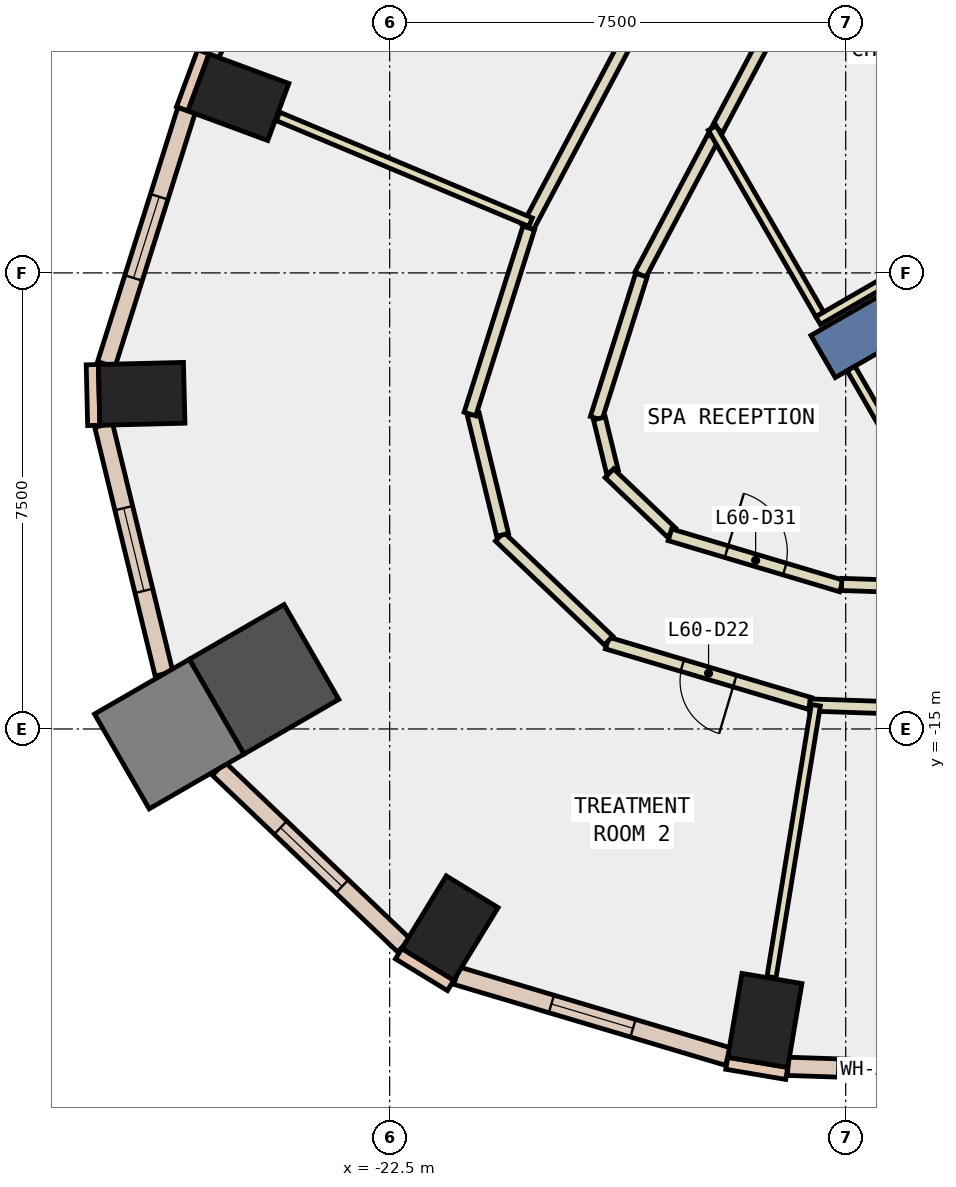
"""IFC4 building model, lengths in metres.
Left out: names, types, materials, properties, quantities, classifications, styles, units other than length and angle.
Written with IfcOpenShell. Run it as: python <this file> out.ifc"""

import sys

from ifc_helpers import new_model, si_unit, direction, frame, frame_2d, origin, origin_2d, place, context, subcontext, project, spatial, rectangle, extrude, element, fill, save


model = new_model("IFC4")
c1 = context("Model", 3, precision=1e-05, world=origin(), true_north=direction((0.0, 1.0)))
c2 = subcontext(c1, "Body", "Model", "MODEL_VIEW")
j1 = project(units=[si_unit("LENGTHUNIT", "METRE"), si_unit("PLANEANGLEUNIT", "RADIAN")], contexts=[c1])
p1 = place(None, origin())
s1 = spatial("IfcSite", under=j1, at=p1, CompositionType="ELEMENT")
p2 = place(p1, origin())
s2 = spatial("IfcBuilding", under=s1, at=p2, CompositionType="ELEMENT")
p3 = place(p2, frame((0.0, 0.0, 263.0)))
s3 = spatial("IfcBuildingStorey", under=s2, at=p3, CompositionType="ELEMENT", Elevation=263.0)
for number, where, z_axis, x_axis in (
    (1, (-16.33, -19.793, -0.34), (0.0, 0.0, 1.0), (-0.986, 0.167, 0.0)),
    (2, (-24.988, -4.611, -0.34), (0.0, 0.0, 1.0), (0.347, 0.938, 0.0)),
    (3, (-26.579, -9.489, -0.34), (0.0, 0.0, 1.0), (-0.025, 1.0, 0.0)),
):
    element("IfcColumn", number, at=place(p3, frame(where, z_axis=z_axis, x_axis=x_axis)), inside=s3, PredefinedType="COLUMN", context=c2, shape_type="SweptSolid", body=[
        extrude(rectangle(XDim=1.0, YDim=1.4, at=origin_2d()), origin(), (0.0, 0.0, 1.0), 3.6),
    ])
p4 = place(p3, frame((-24.566, -14.184, -0.34), z_axis=(0.0, 0.0, 1.0), x_axis=(0.866025403784, 0.5, 0.0)))
e4 = element("IfcColumn", 4, at=p4, inside=s3, PredefinedType="COLUMN", context=c2, shape_type="SweptSolid", body=[
    extrude(rectangle(XDim=1.8, YDim=1.8, at=origin_2d()), origin(), (0.0, 0.0, 1.0), 3.6),
])
p5 = place(p3, frame((-21.508, -18.274, -0.34), z_axis=(0.0, 0.0, 1.0), x_axis=(-0.853341581839, 0.521352227103, 0.0)))
e5 = element("IfcColumn", 5, at=p5, inside=s3, PredefinedType="COLUMN", context=c2, shape_type="SweptSolid", body=[
    extrude(rectangle(XDim=1.0, YDim=1.4, at=origin_2d()), origin(), (0.0, 0.0, 1.0), 3.6),
])
p6 = place(p3, frame((-26.125, -15.084, -0.34), z_axis=(0.0, 0.0, 1.0), x_axis=(0.866025403784, 0.5, 0.0)))
e6 = element("IfcColumn", 6, at=p6, inside=s3, PredefinedType="COLUMN", context=c2, shape_type="SweptSolid", body=[
    extrude(rectangle(XDim=1.8, YDim=1.8, at=origin_2d()), origin(), (0.0, 0.0, 1.0), 3.6),
])
p7 = place(p3, frame((-7.578, -4.375, -0.34), z_axis=(0.0, 0.0, 1.0), x_axis=(-0.866024315419, -0.5000018851, 0.0)))
e7 = element("IfcWall", 7, at=p7, inside=s3, PredefinedType="SHEAR", context=c2, shape_type="SweptSolid", body=[
    extrude(rectangle(XDim=9.0, YDim=0.8, at=frame_2d((4.5, 0.0))), origin(), (0.0, 0.0, 1.0), 3.6),
])
for number, where, z_axis, x_axis in (
    (8, (-25.565, -3.865, 0.0), (0.0, 0.0, 1.0), (-0.347, -0.938, 0.0)),
    (9, (-16.956, -20.498, 0.0), (0.0, 0.0, 1.0), (0.986, -0.167, 0.0)),
):
    element("IfcWall", number, at=place(p3, frame(where, z_axis=z_axis, x_axis=x_axis)), inside=s3, PredefinedType="STANDARD", context=c2, shape_type="SweptSolid", body=[
        extrude(rectangle(XDim=1.0, YDim=0.2, at=frame_2d((0.5, 0.0))), origin(), (0.0, 0.0, 1.0), 3.26),
    ])
p8 = place(p3, frame((-27.391, -9.009, 0.0), z_axis=(0.0, 0.0, 1.0), x_axis=(0.024186470916, -0.999707464524, 0.0)))
e10 = element("IfcWall", 10, at=p8, inside=s3, PredefinedType="STANDARD", context=c2, shape_type="SweptSolid", body=[
    extrude(rectangle(XDim=0.999, YDim=0.2, at=frame_2d((0.5, 0.0))), origin(), (0.0, 0.0, 1.0), 3.26),
])
p9 = place(p3, frame((-22.352, -18.696, 0.0), z_axis=(0.0, 0.0, 1.0), x_axis=(0.853679739553, -0.520798331677, 0.0)))
e11 = element("IfcWall", 11, at=p9, inside=s3, PredefinedType="STANDARD", context=c2, shape_type="SweptSolid", body=[
    extrude(rectangle(XDim=1.0, YDim=0.2, at=frame_2d((0.5, 0.0))), origin(), (0.0, 0.0, 1.0), 3.26),
])
p10 = place(p3, frame((-15.951, -20.548, 0.0), z_axis=(0.0, 0.0, 1.0), x_axis=(0.999450376985, -0.033150323459, 0.0)))
e12 = element("IfcWall", 12, at=p10, inside=s3, PredefinedType="STANDARD", context=c2, shape_type="SweptSolid", body=[
    extrude(rectangle(XDim=7.659, YDim=0.3, at=frame_2d((3.83, 0.0))), origin(), (0.0, 0.0, 1.0), 3.26),
])
p11 = place(p10, frame((0.815, 0.0, 0.9)))
e13 = element("IfcOpeningElement", 13, at=p11, cuts=e12, PredefinedType="OPENING", context=c2, shape_type="SweptSolid", body=[
    extrude(rectangle(XDim=2.2, YDim=2.0, at=frame_2d((1.1, 1.0))), frame((0.0, 0.16, 0.0), z_axis=(0.0, -1.0, 0.0), x_axis=(1.0, 0.0, 0.0)), (0.0, 0.0, 1.0), 0.32),
])
p12 = place(p10, frame((4.644, 0.0, 0.9)))
e14 = element("IfcOpeningElement", 14, at=p12, cuts=e12, PredefinedType="OPENING", context=c2, shape_type="SweptSolid", body=[
    extrude(rectangle(XDim=2.2, YDim=2.0, at=frame_2d((1.1, 1.0))), frame((0.0, 0.16, 0.0), z_axis=(0.0, -1.0, 0.0), x_axis=(1.0, 0.0, 0.0)), (0.0, 0.0, 1.0), 0.32),
])
p13 = place(p3, frame((-22.784, 1.132, 0.0), z_axis=(0.0, 0.0, 1.0), x_axis=(-0.468220106253, -0.883611867338, 0.0)))
e15 = element("IfcWall", 15, at=p13, inside=s3, PredefinedType="STANDARD", context=c2, shape_type="SweptSolid", body=[
    extrude(rectangle(XDim=5.703, YDim=0.3, at=frame_2d((2.852, 0.0))), origin(), (0.0, 0.0, 1.0), 3.26),
])
p14 = place(p13, frame((0.476, 0.0, 0.9)))
e16 = element("IfcOpeningElement", 16, at=p14, cuts=e15, PredefinedType="OPENING", context=c2, shape_type="SweptSolid", body=[
    extrude(rectangle(XDim=1.9, YDim=2.0, at=frame_2d((0.95, 1.0))), frame((0.0, 0.16, 0.0), z_axis=(0.0, -1.0, 0.0), x_axis=(1.0, 0.0, 0.0)), (0.0, 0.0, 1.0), 0.32),
])
p15 = place(p13, frame((3.327, 0.0, 0.9)))
e17 = element("IfcOpeningElement", 17, at=p15, cuts=e15, PredefinedType="OPENING", context=c2, shape_type="SweptSolid", body=[
    extrude(rectangle(XDim=1.9, YDim=2.0, at=frame_2d((0.95, 1.0))), frame((0.0, 0.16, 0.0), z_axis=(0.0, -1.0, 0.0), x_axis=(1.0, 0.0, 0.0)), (0.0, 0.0, 1.0), 0.32),
])
p16 = place(p3, frame((-25.842, -4.827, 0.0), z_axis=(0.0, 0.0, 1.0), x_axis=(-0.30108868778, -0.953596142028, 0.0)))
e18 = element("IfcWall", 18, at=p16, inside=s3, PredefinedType="STANDARD", context=c2, shape_type="SweptSolid", body=[
    extrude(rectangle(XDim=4.38, YDim=0.3, at=frame_2d((2.19, 0.0))), origin(), (0.0, 0.0, 1.0), 3.26),
])
p17 = place(p16, frame((1.49, 0.0, 0.9)))
e19 = element("IfcOpeningElement", 19, at=p17, cuts=e18, PredefinedType="OPENING", context=c2, shape_type="SweptSolid", body=[
    extrude(rectangle(XDim=1.4, YDim=2.0, at=frame_2d((0.7, 1.0))), frame((0.0, 0.16, 0.0), z_axis=(0.0, -1.0, 0.0), x_axis=(1.0, 0.0, 0.0)), (0.0, 0.0, 1.0), 0.32),
])
p18 = place(p3, frame((-27.205, -10.003, 0.0), z_axis=(0.0, 0.0, 1.0), x_axis=(0.236077883519, -0.97173413695, 0.0)))
e20 = element("IfcWall", 20, at=p18, inside=s3, PredefinedType="STANDARD", context=c2, shape_type="SweptSolid", body=[
    extrude(rectangle(XDim=4.211, YDim=0.3, at=frame_2d((2.105, 0.0))), origin(), (0.0, 0.0, 1.0), 3.26),
])
p19 = place(p18, frame((1.405, 0.0, 0.9)))
e21 = element("IfcOpeningElement", 21, at=p19, cuts=e20, PredefinedType="OPENING", context=c2, shape_type="SweptSolid", body=[
    extrude(rectangle(XDim=1.4, YDim=2.0, at=frame_2d((0.7, 1.0))), frame((0.0, 0.16, 0.0), z_axis=(0.0, -1.0, 0.0), x_axis=(1.0, 0.0, 0.0)), (0.0, 0.0, 1.0), 0.32),
])
p20 = place(p3, frame((-25.312, -15.653, 0.0), z_axis=(0.0, 0.0, 1.0), x_axis=(0.723526681061, -0.690296415892, 0.0)))
e22 = element("IfcWall", 22, at=p20, inside=s3, PredefinedType="STANDARD", context=c2, shape_type="SweptSolid", body=[
    extrude(rectangle(XDim=4.21, YDim=0.3, at=frame_2d((2.105, 0.0))), origin(), (0.0, 0.0, 1.0), 3.26),
])
p21 = place(p20, frame((1.405, 0.0, 0.9)))
e23 = element("IfcOpeningElement", 23, at=p21, cuts=e22, PredefinedType="OPENING", context=c2, shape_type="SweptSolid", body=[
    extrude(rectangle(XDim=1.4, YDim=2.0, at=frame_2d((0.7, 1.0))), frame((0.0, 0.16, 0.0), z_axis=(0.0, -1.0, 0.0), x_axis=(1.0, 0.0, 0.0)), (0.0, 0.0, 1.0), 0.32),
])
p22 = place(p3, frame((-21.401, -19.057, 0.0), z_axis=(0.0, 0.0, 1.0), x_axis=(0.958361270465, -0.285558532131, 0.0)))
e24 = element("IfcWall", 24, at=p22, inside=s3, PredefinedType="STANDARD", context=c2, shape_type="SweptSolid", body=[
    extrude(rectangle(XDim=4.658, YDim=0.3, at=frame_2d((2.329, 0.0))), origin(), (0.0, 0.0, 1.0), 3.26),
])
p23 = place(p22, frame((1.629, 0.0, 0.9)))
e25 = element("IfcOpeningElement", 25, at=p23, cuts=e24, PredefinedType="OPENING", context=c2, shape_type="SweptSolid", body=[
    extrude(rectangle(XDim=1.4, YDim=2.0, at=frame_2d((0.7, 1.0))), frame((0.0, 0.16, 0.0), z_axis=(0.0, -1.0, 0.0), x_axis=(1.0, 0.0, 0.0)), (0.0, 0.0, 1.0), 0.32),
])
p24 = place(p3, frame((-15.56, -2.214, 0.0), z_axis=(0.0, 0.0, 1.0), x_axis=(-0.468104679961, -0.883673021314, 0.0)))
e26 = element("IfcWall", 26, at=p24, inside=s3, PredefinedType="PARTITIONING", context=c2, shape_type="SweptSolid", body=[
    extrude(rectangle(XDim=3.309, YDim=0.2, at=frame_2d((1.654, 0.0))), origin(), (0.0, 0.0, 1.0), 3.26),
])
p25 = place(p3, frame((-17.18, -5.271, 0.0), z_axis=(0.0, 0.0, 1.0), x_axis=(-0.468212372113, -0.883615965564, 0.0)))
e27 = element("IfcWall", 27, at=p25, inside=s3, PredefinedType="PARTITIONING", context=c2, shape_type="SweptSolid", body=[
    extrude(rectangle(XDim=2.557, YDim=0.2, at=frame_2d((1.278, 0.0))), origin(), (0.0, 0.0, 1.0), 3.26),
])
p26 = place(p3, frame((-18.36, -7.537, 0.0), z_axis=(0.0, 0.0, 1.0), x_axis=(-0.301325410186, -0.953521366922, 0.0)))
e28 = element("IfcWall", 28, at=p26, inside=s3, PredefinedType="PARTITIONING", context=c2, shape_type="SweptSolid", body=[
    extrude(rectangle(XDim=2.469, YDim=0.2, at=frame_2d((1.234, 0.0))), origin(), (0.0, 0.0, 1.0), 3.26),
])
p27 = place(p3, frame((-19.051, -9.893, 0.0), z_axis=(0.0, 0.0, 1.0), x_axis=(0.237162553963, -0.971469980492, 0.0)))
e29 = element("IfcWall", 29, at=p27, inside=s3, PredefinedType="PARTITIONING", context=c2, shape_type="SweptSolid", body=[
    extrude(rectangle(XDim=0.899, YDim=0.2, at=frame_2d((0.449, 0.0))), origin(), (0.0, 0.0, 1.0), 3.26),
])
p28 = place(p3, frame((-18.887, -10.794, 0.0), z_axis=(0.0, 0.0, 1.0), x_axis=(0.723206051435, -0.690632324155, 0.0)))
e30 = element("IfcWall", 30, at=p28, inside=s3, PredefinedType="PARTITIONING", context=c2, shape_type="SweptSolid", body=[
    extrude(rectangle(XDim=1.409, YDim=0.2, at=frame_2d((0.705, 0.0))), origin(), (0.0, 0.0, 1.0), 3.26),
])
p29 = place(p3, frame((-17.891, -11.807, 0.0), z_axis=(0.0, 0.0, 1.0), x_axis=(0.958288558025, -0.28580244848, 0.0)))
e31 = element("IfcWall", 31, at=p29, inside=s3, PredefinedType="PARTITIONING", context=c2, shape_type="SweptSolid", body=[
    extrude(rectangle(XDim=2.943, YDim=0.2, at=frame_2d((1.471, 0.0))), origin(), (0.0, 0.0, 1.0), 3.26),
])
p30 = place(p29, frame((0.971, 0.0, 0.0)))
e32 = element("IfcOpeningElement", 32, at=p30, cuts=e31, PredefinedType="OPENING", context=c2, shape_type="SweptSolid", body=[
    extrude(rectangle(XDim=1.0, YDim=2.1, at=frame_2d((0.5, 1.05))), frame((0.0, 0.11, 0.0), z_axis=(0.0, -1.0, 0.0), x_axis=(1.0, 0.0, 0.0)), (0.0, 0.0, 1.0), 0.22),
])
p31 = place(p3, frame((-15.067, -12.623, 0.0), z_axis=(0.0, 0.0, 1.0), x_axis=(0.99945112134, -0.033127874247, 0.0)))
e33 = element("IfcWall", 33, at=p31, inside=s3, PredefinedType="PARTITIONING", context=c2, shape_type="SweptSolid", body=[
    extrude(rectangle(XDim=2.174, YDim=0.2, at=frame_2d((1.087, 0.0))), origin(), (0.0, 0.0, 1.0), 3.26),
])
p32 = place(p3, frame((-20.229, -6.754, 0.0), z_axis=(0.0, 0.0, 1.0), x_axis=(0.468313568794, 0.883562335822, 0.0)))
e34 = element("IfcWall", 34, at=p32, inside=s3, PredefinedType="PARTITIONING", context=c2, shape_type="SweptSolid", body=[
    extrude(rectangle(XDim=6.216, YDim=0.2, at=frame_2d((3.108, 0.0))), origin(), (0.0, 0.0, 1.0), 3.26),
])
p33 = place(p3, frame((-15.587, -14.581, 0.0), z_axis=(0.0, 0.0, 1.0), x_axis=(-0.958378336681, 0.285501250052, 0.0)))
e35 = element("IfcWall", 35, at=p33, inside=s3, PredefinedType="PARTITIONING", context=c2, shape_type="SweptSolid", body=[
    extrude(rectangle(XDim=3.482, YDim=0.2, at=frame_2d((1.741, 0.0))), origin(), (0.0, 0.0, 1.0), 3.26),
])
p34 = place(p33, frame((1.291, 0.0, 0.0)))
e36 = element("IfcOpeningElement", 36, at=p34, cuts=e35, PredefinedType="OPENING", context=c2, shape_type="SweptSolid", body=[
    extrude(rectangle(XDim=0.9, YDim=2.1, at=frame_2d((0.45, 1.05))), frame((0.0, 0.11, 0.0), z_axis=(0.0, -1.0, 0.0), x_axis=(1.0, 0.0, 0.0)), (0.0, 0.0, 1.0), 0.22),
])
p35 = place(p3, frame((-18.9, -13.546, 0.0), z_axis=(0.0, 0.0, 1.0), x_axis=(-0.723668833869, 0.690147389248, 0.0)))
e37 = element("IfcWall", 37, at=p35, inside=s3, PredefinedType="PARTITIONING", context=c2, shape_type="SweptSolid", body=[
    extrude(rectangle(XDim=2.476, YDim=0.2, at=frame_2d((1.238, 0.0))), origin(), (0.0, 0.0, 1.0), 3.26),
])
p36 = place(p3, frame((-20.643, -11.808, 0.0), z_axis=(0.0, 0.0, 1.0), x_axis=(-0.236372924437, 0.971662410816, 0.0)))
e38 = element("IfcWall", 38, at=p36, inside=s3, PredefinedType="PARTITIONING", context=c2, shape_type="SweptSolid", body=[
    extrude(rectangle(XDim=2.043, YDim=0.2, at=frame_2d((1.021, 0.0))), origin(), (0.0, 0.0, 1.0), 3.26),
])
p37 = place(p3, frame((-21.18, -9.821, 0.0), z_axis=(0.0, 0.0, 1.0), x_axis=(0.301331608119, 0.953519408271, 0.0)))
e39 = element("IfcWall", 39, at=p37, inside=s3, PredefinedType="PARTITIONING", context=c2, shape_type="SweptSolid", body=[
    extrude(rectangle(XDim=3.209, YDim=0.2, at=frame_2d((1.604, 0.0))), origin(), (0.0, 0.0, 1.0), 3.26),
])
p38 = place(p3, frame((-7.7, -14.869, 0.0), z_axis=(0.0, 0.0, 1.0), x_axis=(-0.999445318732, 0.03330247535, 0.0)))
e40 = element("IfcWall", 40, at=p38, inside=s3, PredefinedType="PARTITIONING", context=c2, shape_type="SweptSolid", body=[
    extrude(rectangle(XDim=7.896, YDim=0.2, at=frame_2d((3.948, 0.0))), origin(), (0.0, 0.0, 1.0), 3.26),
])
p39 = place(p38, frame((3.498, 0.0, 0.0)))
e41 = element("IfcOpeningElement", 41, at=p39, cuts=e40, PredefinedType="OPENING", context=c2, shape_type="SweptSolid", body=[
    extrude(rectangle(XDim=0.9, YDim=2.1, at=frame_2d((0.45, 1.05))), frame((0.0, 0.11, 0.0), z_axis=(0.0, -1.0, 0.0), x_axis=(1.0, 0.0, 0.0)), (0.0, 0.0, 1.0), 0.22),
])
p40 = place(p3, frame((-9.24, -4.695, 0.0), z_axis=(0.0, 0.0, 1.0), x_axis=(-0.866015037582, -0.500017954359, 0.0)))
e42 = element("IfcWall", 42, at=p40, inside=s3, PredefinedType="PARTITIONING", context=c2, shape_type="SweptSolid", body=[
    extrude(rectangle(XDim=7.176, YDim=0.15, at=frame_2d((3.588, 0.0))), origin(), (0.0, 0.0, 1.0), 3.26),
])
p41 = place(p3, frame((-15.427, -8.18, 0.0), z_axis=(0.0, 0.0, 1.0), x_axis=(-0.500045204515, 0.865999303373, 0.0)))
e43 = element("IfcWall", 43, at=p41, inside=s3, PredefinedType="PARTITIONING", context=c2, shape_type="SweptSolid", body=[
    extrude(rectangle(XDim=3.536, YDim=0.15, at=frame_2d((1.768, 0.0))), origin(), (0.0, 0.0, 1.0), 3.26),
])
p42 = place(p3, frame((-12.769, -12.784, 0.0), z_axis=(0.0, 0.0, 1.0), x_axis=(-0.499998569178, 0.866026229868, 0.0)))
e44 = element("IfcWall", 44, at=p42, inside=s3, PredefinedType="PARTITIONING", context=c2, shape_type="SweptSolid", body=[
    extrude(rectangle(XDim=4.286, YDim=0.15, at=frame_2d((2.143, 0.0))), origin(), (0.0, 0.0, 1.0), 3.26),
])
p43 = place(p3, frame((-20.183, -6.666, 0.0), z_axis=(0.0, 0.0, 1.0), x_axis=(-0.922347108299, 0.386362280525, 0.0)))
e45 = element("IfcWall", 45, at=p43, inside=s3, PredefinedType="PARTITIONING", context=c2, shape_type="SweptSolid", body=[
    extrude(rectangle(XDim=4.503, YDim=0.15, at=frame_2d((2.252, 0.0))), origin(), (0.0, 0.0, 1.0), 3.26),
])
p44 = place(p3, frame((-15.491, -14.61, 0.0), z_axis=(0.0, 0.0, 1.0), x_axis=(-0.160928343418, -0.986966092774, 0.0)))
e46 = element("IfcWall", 46, at=p44, inside=s3, PredefinedType="PARTITIONING", context=c2, shape_type="SweptSolid", body=[
    extrude(rectangle(XDim=4.53, YDim=0.15, at=frame_2d((2.265, 0.0))), origin(), (0.0, 0.0, 1.0), 3.26),
])
p45 = place(p11, origin())
e47 = element("IfcWindow", 47, at=p45, inside=s3, PartitioningType="SINGLE_PANEL", PredefinedType="WINDOW", context=c2, shape_type="SweptSolid", body=[
    extrude(rectangle(XDim=2.2, YDim=2.0, at=frame_2d((1.1, 1.0))), frame((0.0, 0.03, 0.0), z_axis=(0.0, -1.0, 0.0), x_axis=(1.0, 0.0, 0.0)), (0.0, 0.0, 1.0), 0.06),
])
fill(e13, e47)
p46 = place(p17, origin())
e48 = element("IfcWindow", 48, at=p46, inside=s3, PartitioningType="SINGLE_PANEL", PredefinedType="WINDOW", context=c2, shape_type="SweptSolid", body=[
    extrude(rectangle(XDim=1.4, YDim=2.0, at=frame_2d((0.7, 1.0))), frame((0.0, 0.03, 0.0), z_axis=(0.0, -1.0, 0.0), x_axis=(1.0, 0.0, 0.0)), (0.0, 0.0, 1.0), 0.06),
])
fill(e19, e48)
p47 = place(p19, origin())
e49 = element("IfcWindow", 49, at=p47, inside=s3, PartitioningType="SINGLE_PANEL", PredefinedType="WINDOW", context=c2, shape_type="SweptSolid", body=[
    extrude(rectangle(XDim=1.4, YDim=2.0, at=frame_2d((0.7, 1.0))), frame((0.0, 0.03, 0.0), z_axis=(0.0, -1.0, 0.0), x_axis=(1.0, 0.0, 0.0)), (0.0, 0.0, 1.0), 0.06),
])
fill(e21, e49)
p48 = place(p21, origin())
e50 = element("IfcWindow", 50, at=p48, inside=s3, PartitioningType="SINGLE_PANEL", PredefinedType="WINDOW", context=c2, shape_type="SweptSolid", body=[
    extrude(rectangle(XDim=1.4, YDim=2.0, at=frame_2d((0.7, 1.0))), frame((0.0, 0.03, 0.0), z_axis=(0.0, -1.0, 0.0), x_axis=(1.0, 0.0, 0.0)), (0.0, 0.0, 1.0), 0.06),
])
fill(e23, e50)
p49 = place(p23, origin())
e51 = element("IfcWindow", 51, at=p49, inside=s3, PartitioningType="SINGLE_PANEL", PredefinedType="WINDOW", context=c2, shape_type="SweptSolid", body=[
    extrude(rectangle(XDim=1.4, YDim=2.0, at=frame_2d((0.7, 1.0))), frame((0.0, 0.03, 0.0), z_axis=(0.0, -1.0, 0.0), x_axis=(1.0, 0.0, 0.0)), (0.0, 0.0, 1.0), 0.06),
])
fill(e25, e51)
p50 = place(p34, origin())
e52 = element("IfcDoor", 52, at=p50, inside=s3, OperationType="SINGLE_SWING_LEFT", PredefinedType="DOOR", context=c2, shape_type="SweptSolid", body=[
    extrude(rectangle(XDim=0.9, YDim=2.1, at=frame_2d((0.45, 1.05))), frame((0.0, 0.025, 0.0), z_axis=(0.0, -1.0, 0.0), x_axis=(1.0, 0.0, 0.0)), (0.0, 0.0, 1.0), 0.05),
])
fill(e36, e52)
p51 = place(p30, origin())
e53 = element("IfcDoor", 53, at=p51, inside=s3, OperationType="SINGLE_SWING_LEFT", PredefinedType="DOOR", context=c2, shape_type="SweptSolid", body=[
    extrude(rectangle(XDim=1.0, YDim=2.1, at=frame_2d((0.5, 1.05))), frame((0.0, 0.025, 0.0), z_axis=(0.0, -1.0, 0.0), x_axis=(1.0, 0.0, 0.0)), (0.0, 0.0, 1.0), 0.05),
])
fill(e32, e53)
save(model, sys.argv[1])
